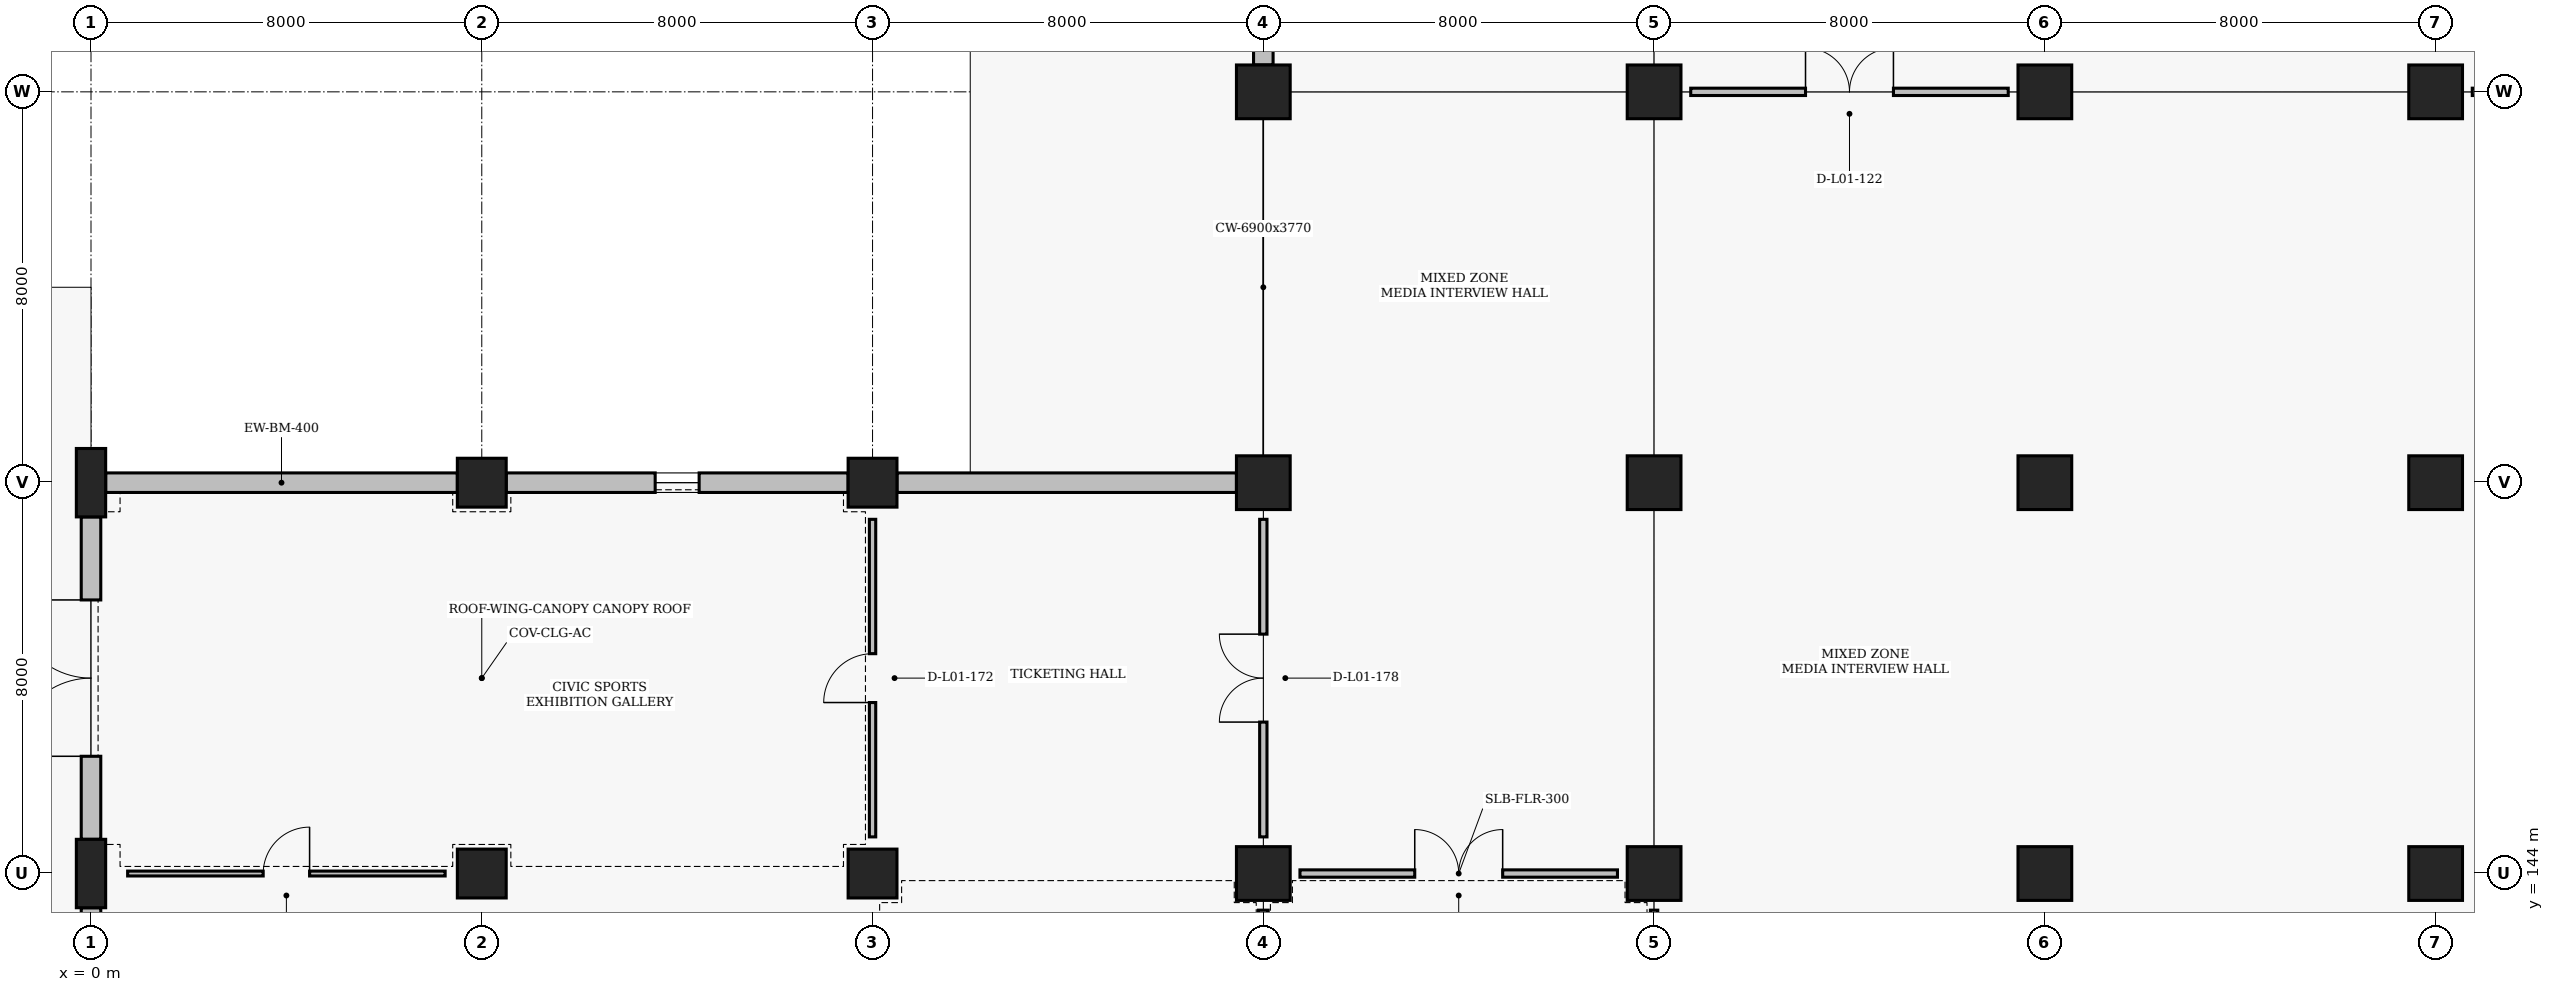
"""IFC4 building model, lengths in metres.
Left out: names, types, materials, properties, quantities, classifications, styles, units other than length and angle.
Written with IfcOpenShell. Run it as: python <this file> out.ifc"""

import sys

from ifc_helpers import new_model, si_unit, direction, frame, frame_2d, origin, origin_2d, place, context, subcontext, project, spatial, rectangle, circle, extrude, element, fill, save


model = new_model("IFC4")
c1 = context("Model", 3, precision=1e-05, world=origin(), true_north=direction((0.0, 1.0)))
c2 = subcontext(c1, "Body", "Model", "MODEL_VIEW")
j1 = project(units=[si_unit("LENGTHUNIT", "METRE"), si_unit("PLANEANGLEUNIT", "RADIAN")], contexts=[c1])
p1 = place(None, origin())
s1 = spatial("IfcSite", under=j1, at=p1, CompositionType="ELEMENT")
p2 = place(p1, origin())
s2 = spatial("IfcBuilding", under=s1, at=p2, CompositionType="ELEMENT")
p3 = place(p2, origin())
s3 = spatial("IfcBuildingStorey", under=s2, at=p3, CompositionType="ELEMENT", Elevation=0.0)
for number, where, z_axis, x_axis in (
    (1, (0.0, 144.0, 0.0), (0.0, 0.0, 1.0), (1.0, 0.0, 0.0)),
    (2, (0.0, 152.0, 0.0), (0.0, 0.0, 1.0), (1.0, 0.0, 0.0)),
):
    element("IfcColumn", number, at=place(p3, frame(where, z_axis=z_axis, x_axis=x_axis)), inside=s3, PredefinedType="PILASTER", context=c2, shape_type="SweptSolid", body=[
        extrude(rectangle(XDim=0.6, YDim=1.4, at=origin_2d()), origin(), (0.0, 0.0, 1.0), 4.8),
    ])
for number, where, z_axis, x_axis in (
    (3, (8.0, 144.0, 0.0), (0.0, 0.0, 1.0), (1.0, 0.0, 0.0)),
    (4, (8.0, 152.0, 0.0), (0.0, 0.0, 1.0), (1.0, 0.0, 0.0)),
    (5, (16.0, 144.0, 0.0), (0.0, 0.0, 1.0), (1.0, 0.0, 0.0)),
    (6, (16.0, 152.0, 0.0), (0.0, 0.0, 1.0), (1.0, 0.0, 0.0)),
):
    element("IfcColumn", number, at=place(p3, frame(where, z_axis=z_axis, x_axis=x_axis)), inside=s3, PredefinedType="COLUMN", context=c2, shape_type="SweptSolid", body=[
        extrude(circle(Radius=0.5, at=origin_2d()), origin(), (0.0, 0.0, 1.0), 4.8),
    ])
for number, where, z_axis, x_axis in (
    (7, (24.0, 144.0, 0.0), (0.0, 0.0, 1.0), (1.0, 0.0, 0.0)),
    (8, (24.0, 152.0, 0.0), (0.0, 0.0, 1.0), (1.0, 0.0, 0.0)),
    (9, (24.0, 160.0, 0.0), (0.0, 0.0, 1.0), (1.0, 0.0, 0.0)),
    (10, (32.0, 144.0, 0.0), (0.0, 0.0, 1.0), (1.0, 0.0, 0.0)),
    (11, (32.0, 152.0, 0.0), (0.0, 0.0, 1.0), (1.0, 0.0, 0.0)),
    (12, (32.0, 160.0, 0.0), (0.0, 0.0, 1.0), (1.0, 0.0, 0.0)),
    (13, (40.0, 144.0, 0.0), (0.0, 0.0, 1.0), (1.0, 0.0, 0.0)),
    (14, (40.0, 152.0, 0.0), (0.0, 0.0, 1.0), (1.0, 0.0, 0.0)),
    (15, (40.0, 160.0, 0.0), (0.0, 0.0, 1.0), (1.0, 0.0, 0.0)),
    (16, (48.0, 144.0, 0.0), (0.0, 0.0, 1.0), (1.0, 0.0, 0.0)),
    (17, (48.0, 152.0, 0.0), (0.0, 0.0, 1.0), (1.0, 0.0, 0.0)),
    (18, (48.0, 160.0, 0.0), (0.0, 0.0, 1.0), (1.0, 0.0, 0.0)),
):
    element("IfcColumn", number, at=place(p3, frame(where, z_axis=z_axis, x_axis=x_axis)), inside=s3, PredefinedType="COLUMN", context=c2, shape_type="SweptSolid", body=[
        extrude(rectangle(XDim=1.1, YDim=1.1, at=origin_2d()), origin(), (0.0, 0.0, 1.0), 4.8),
    ])
p4 = place(p3, frame((0.0, 136.7, 0.0), z_axis=(0.0, 0.0, 1.0), x_axis=(0.0, 1.0, 0.0)))
e19 = element("IfcWall", 19, at=p4, inside=s3, PredefinedType="SOLIDWALL", context=c2, shape_type="SweptSolid", body=[
    extrude(rectangle(XDim=6.6, YDim=0.4, at=frame_2d((3.3, 0.0))), origin(), (0.0, 0.0, 1.0), 3.91),
])
p5 = place(p4, frame((2.0, 0.0, 0.0)))
e20 = element("IfcOpeningElement", 20, at=p5, cuts=e19, PredefinedType="OPENING", context=c2, shape_type="SweptSolid", body=[
    extrude(rectangle(XDim=2.6, YDim=2.5, at=frame_2d((1.3, 1.25))), frame((0.0, 0.21, 0.0), z_axis=(0.0, -1.0, 0.0), x_axis=(1.0, 0.0, 0.0)), (0.0, 0.0, 1.0), 0.42),
])
p6 = place(p3, frame((0.3, 152.0, 0.0), z_axis=(0.0, 0.0, 1.0), x_axis=(1.0, 0.0, 0.0)))
e21 = element("IfcWall", 21, at=p6, inside=s3, PredefinedType="SOLIDWALL", context=c2, shape_type="SweptSolid", body=[
    extrude(rectangle(XDim=7.2, YDim=0.4, at=frame_2d((3.6, 0.0))), origin(), (0.0, 0.0, 1.0), 3.87),
])
p7 = place(p3, frame((0.0, 144.7, 0.0), z_axis=(0.0, 0.0, 1.0), x_axis=(0.0, 1.0, 0.0)))
e22 = element("IfcWall", 22, at=p7, inside=s3, PredefinedType="SOLIDWALL", context=c2, shape_type="SweptSolid", body=[
    extrude(rectangle(XDim=6.6, YDim=0.4, at=frame_2d((3.3, 0.0))), origin(), (0.0, 0.0, 1.0), 3.95),
])
p8 = place(p7, frame((1.7, 0.0, 0.0)))
e23 = element("IfcOpeningElement", 23, at=p8, cuts=e22, PredefinedType="OPENING", context=c2, shape_type="SweptSolid", body=[
    extrude(rectangle(XDim=3.2, YDim=2.7, at=frame_2d((1.6, 1.35))), frame((0.0, 0.21, 0.0), z_axis=(0.0, -1.0, 0.0), x_axis=(1.0, 0.0, 0.0)), (0.0, 0.0, 1.0), 0.42),
])
p9 = place(p3, frame((8.5, 152.0, 0.0), z_axis=(0.0, 0.0, 1.0), x_axis=(1.0, 0.0, 0.0)))
e24 = element("IfcWall", 24, at=p9, inside=s3, PredefinedType="SOLIDWALL", context=c2, shape_type="SweptSolid", body=[
    extrude(rectangle(XDim=7.0, YDim=0.4, at=frame_2d((3.5, 0.0))), origin(), (0.0, 0.0, 1.0), 3.87),
])
p10 = place(p9, frame((3.05, 0.0, 0.95)))
e25 = element("IfcOpeningElement", 25, at=p10, cuts=e24, PredefinedType="OPENING", context=c2, shape_type="SweptSolid", body=[
    extrude(rectangle(XDim=0.9, YDim=1.5, at=frame_2d((0.45, 0.75))), frame((0.0, 0.21, 0.0), z_axis=(0.0, -1.0, 0.0), x_axis=(1.0, 0.0, 0.0)), (0.0, 0.0, 1.0), 0.42),
])
p11 = place(p3, frame((16.5, 152.0, 0.0), z_axis=(0.0, 0.0, 1.0), x_axis=(1.0, 0.0, 0.0)))
e26 = element("IfcWall", 26, at=p11, inside=s3, PredefinedType="SOLIDWALL", context=c2, shape_type="SweptSolid", body=[
    extrude(rectangle(XDim=6.95, YDim=0.4, at=frame_2d((3.475, 0.0))), origin(), (0.0, 0.0, 1.0), 3.77),
])
p12 = place(p3, frame((24.0, 160.55, 0.0), z_axis=(0.0, 0.0, 1.0), x_axis=(0.0, 1.0, 0.0)))
e27 = element("IfcWall", 27, at=p12, inside=s3, PredefinedType="SOLIDWALL", context=c2, shape_type="SweptSolid", body=[
    extrude(rectangle(XDim=6.9, YDim=0.4, at=frame_2d((3.45, 0.0))), origin(), (0.0, 0.0, 1.0), 3.87),
])
p13 = place(p3, frame((24.0, 136.75, 0.0), z_axis=(0.0, 0.0, 1.0), x_axis=(0.0, 1.0, 0.0)))
e28 = element("IfcWall", 28, at=p13, inside=s3, PredefinedType="PARTITIONING", context=c2, shape_type="SweptSolid", body=[
    extrude(rectangle(XDim=6.5, YDim=0.2, at=frame_2d((3.25, 0.0))), origin(), (0.0, 0.0, 1.0), 3.77),
])
p14 = place(p3, frame((24.75, 144.0, 0.0), z_axis=(0.0, 0.0, 1.0), x_axis=(1.0, 0.0, 0.0)))
e29 = element("IfcWall", 29, at=p14, inside=s3, PredefinedType="PARTITIONING", context=c2, shape_type="SweptSolid", body=[
    extrude(rectangle(XDim=6.5, YDim=0.15, at=frame_2d((3.25, 0.0))), origin(), (0.0, 0.0, 1.0), 3.87),
])
p15 = place(p14, frame((2.35, 0.0, 0.0)))
e30 = element("IfcOpeningElement", 30, at=p15, cuts=e29, PredefinedType="OPENING", context=c2, shape_type="SweptSolid", body=[
    extrude(rectangle(XDim=1.8, YDim=2.3, at=frame_2d((0.9, 1.15))), frame((0.0, 0.085, 0.0), z_axis=(0.0, -1.0, 0.0), x_axis=(1.0, 0.0, 0.0)), (0.0, 0.0, 1.0), 0.17),
])
p16 = place(p3, frame((32.0, 136.75, 0.0), z_axis=(0.0, 0.0, 1.0), x_axis=(0.0, 1.0, 0.0)))
e31 = element("IfcWall", 31, at=p16, inside=s3, PredefinedType="PARTITIONING", context=c2, shape_type="SweptSolid", body=[
    extrude(rectangle(XDim=6.5, YDim=0.15, at=frame_2d((3.25, 0.0))), origin(), (0.0, 0.0, 1.0), 3.77),
])
p17 = place(p16, frame((2.35, 0.0, 0.0)))
e32 = element("IfcOpeningElement", 32, at=p17, cuts=e31, PredefinedType="OPENING", context=c2, shape_type="SweptSolid", body=[
    extrude(rectangle(XDim=1.8, YDim=2.3, at=frame_2d((0.9, 1.15))), frame((0.0, 0.085, 0.0), z_axis=(0.0, -1.0, 0.0), x_axis=(1.0, 0.0, 0.0)), (0.0, 0.0, 1.0), 0.17),
])
p18 = place(p3, frame((32.75, 160.0, 0.0), z_axis=(0.0, 0.0, 1.0), x_axis=(1.0, 0.0, 0.0)))
e33 = element("IfcWall", 33, at=p18, inside=s3, PredefinedType="PARTITIONING", context=c2, shape_type="SweptSolid", body=[
    extrude(rectangle(XDim=6.5, YDim=0.15, at=frame_2d((3.25, 0.0))), origin(), (0.0, 0.0, 1.0), 3.87),
])
p19 = place(p18, frame((2.35, 0.0, 0.0)))
e34 = element("IfcOpeningElement", 34, at=p19, cuts=e33, PredefinedType="OPENING", context=c2, shape_type="SweptSolid", body=[
    extrude(rectangle(XDim=1.8, YDim=2.3, at=frame_2d((0.9, 1.15))), frame((0.0, 0.085, 0.0), z_axis=(0.0, -1.0, 0.0), x_axis=(1.0, 0.0, 0.0)), (0.0, 0.0, 1.0), 0.17),
])
p20 = place(p3, frame((48.75, 160.0, 0.0), z_axis=(0.0, 0.0, 1.0), x_axis=(1.0, 0.0, 0.0)))
e35 = element("IfcWall", 35, at=p20, inside=s3, PredefinedType="PARTITIONING", context=c2, shape_type="SweptSolid", body=[
    extrude(rectangle(XDim=6.5, YDim=0.15, at=frame_2d((3.25, 0.0))), origin(), (0.0, 0.0, 1.0), 3.87),
])
p21 = place(p20, frame((2.35, 0.0, 0.0)))
e36 = element("IfcOpeningElement", 36, at=p21, cuts=e35, PredefinedType="OPENING", context=c2, shape_type="SweptSolid", body=[
    extrude(rectangle(XDim=1.8, YDim=2.3, at=frame_2d((0.9, 1.15))), frame((0.0, 0.085, 0.0), z_axis=(0.0, -1.0, 0.0), x_axis=(1.0, 0.0, 0.0)), (0.0, 0.0, 1.0), 0.17),
])
p22 = place(p3, frame((0.75, 144.0, 0.0), z_axis=(0.0, 0.0, 1.0), x_axis=(1.0, 0.0, 0.0)))
e37 = element("IfcWall", 37, at=p22, inside=s3, PredefinedType="PARTITIONING", context=c2, shape_type="SweptSolid", body=[
    extrude(rectangle(XDim=6.5, YDim=0.1, at=frame_2d((3.25, 0.0))), origin(), (0.0, 0.0, 1.0), 3.91),
])
p23 = place(p22, frame((2.775, 0.0, 0.0)))
e38 = element("IfcOpeningElement", 38, at=p23, cuts=e37, PredefinedType="OPENING", context=c2, shape_type="SweptSolid", body=[
    extrude(rectangle(XDim=0.95, YDim=2.1, at=frame_2d((0.475, 1.05))), frame((0.0, 0.06, 0.0), z_axis=(0.0, -1.0, 0.0), x_axis=(1.0, 0.0, 0.0)), (0.0, 0.0, 1.0), 0.12),
])
p24 = place(p3, frame((16.0, 144.75, 0.0), z_axis=(0.0, 0.0, 1.0), x_axis=(0.0, 1.0, 0.0)))
e39 = element("IfcWall", 39, at=p24, inside=s3, PredefinedType="PARTITIONING", context=c2, shape_type="SweptSolid", body=[
    extrude(rectangle(XDim=6.5, YDim=0.13, at=frame_2d((3.25, 0.0))), origin(), (0.0, 0.0, 1.0), 3.87),
])
p25 = place(p24, frame((2.75, 0.0, 0.0)))
e40 = element("IfcOpeningElement", 40, at=p25, cuts=e39, PredefinedType="OPENING", context=c2, shape_type="SweptSolid", body=[
    extrude(rectangle(XDim=1.0, YDim=2.1, at=frame_2d((0.5, 1.05))), frame((0.0, 0.075, 0.0), z_axis=(0.0, -1.0, 0.0), x_axis=(1.0, 0.0, 0.0)), (0.0, 0.0, 1.0), 0.15),
])
p26 = place(p3, frame((24.0, 144.75, 0.0), z_axis=(0.0, 0.0, 1.0), x_axis=(0.0, 1.0, 0.0)))
e41 = element("IfcWall", 41, at=p26, inside=s3, PredefinedType="PARTITIONING", context=c2, shape_type="SweptSolid", body=[
    extrude(rectangle(XDim=6.5, YDim=0.15, at=frame_2d((3.25, 0.0))), origin(), (0.0, 0.0, 1.0), 3.77),
])
p27 = place(p26, frame((2.35, 0.0, 0.0)))
e42 = element("IfcOpeningElement", 42, at=p27, cuts=e41, PredefinedType="OPENING", context=c2, shape_type="SweptSolid", body=[
    extrude(rectangle(XDim=1.8, YDim=2.3, at=frame_2d((0.9, 1.15))), frame((0.0, 0.085, 0.0), z_axis=(0.0, -1.0, 0.0), x_axis=(1.0, 0.0, 0.0)), (0.0, 0.0, 1.0), 0.17),
])
p28 = place(p8, origin())
e43 = element("IfcDoor", 43, at=p28, inside=s3, OperationType="DOUBLE_SWING_LEFT", PredefinedType="DOOR", context=c2, shape_type="SweptSolid", body=[
    extrude(rectangle(XDim=3.2, YDim=2.7, at=frame_2d((1.6, 1.35))), frame((0.0, 0.025, 0.0), z_axis=(0.0, -1.0, 0.0), x_axis=(1.0, 0.0, 0.0)), (0.0, 0.0, 1.0), 0.05),
])
fill(e23, e43)
p29 = place(p10, origin())
e44 = element("IfcWindow", 44, at=p29, inside=s3, PartitioningType="SINGLE_PANEL", PredefinedType="WINDOW", context=c2, shape_type="SweptSolid", body=[
    extrude(rectangle(XDim=0.9, YDim=1.5, at=frame_2d((0.45, 0.75))), frame((0.0, 0.03, 0.0), z_axis=(0.0, -1.0, 0.0), x_axis=(1.0, 0.0, 0.0)), (0.0, 0.0, 1.0), 0.06),
])
fill(e25, e44)
p30 = place(p15, origin())
e45 = element("IfcDoor", 45, at=p30, inside=s3, OperationType="DOUBLE_SWING_LEFT", PredefinedType="DOOR", context=c2, shape_type="SweptSolid", body=[
    extrude(rectangle(XDim=1.8, YDim=2.3, at=frame_2d((0.9, 1.15))), frame((0.0, 0.025, 0.0), z_axis=(0.0, -1.0, 0.0), x_axis=(1.0, 0.0, 0.0)), (0.0, 0.0, 1.0), 0.05),
])
fill(e30, e45)
p31 = place(p19, origin())
e46 = element("IfcDoor", 46, at=p31, inside=s3, OperationType="DOUBLE_SWING_LEFT", PredefinedType="DOOR", context=c2, shape_type="SweptSolid", body=[
    extrude(rectangle(XDim=1.8, YDim=2.3, at=frame_2d((0.9, 1.15))), frame((0.0, 0.025, 0.0), z_axis=(0.0, -1.0, 0.0), x_axis=(1.0, 0.0, 0.0)), (0.0, 0.0, 1.0), 0.05),
])
fill(e34, e46)
p32 = place(p23, origin())
e47 = element("IfcDoor", 47, at=p32, inside=s3, OperationType="SINGLE_SWING_RIGHT", PredefinedType="DOOR", context=c2, shape_type="SweptSolid", body=[
    extrude(rectangle(XDim=0.95, YDim=2.1, at=frame_2d((0.475, 1.05))), frame((0.0, 0.025, 0.0), z_axis=(0.0, -1.0, 0.0), x_axis=(1.0, 0.0, 0.0)), (0.0, 0.0, 1.0), 0.05),
])
fill(e38, e47)
p33 = place(p25, origin())
e48 = element("IfcDoor", 48, at=p33, inside=s3, OperationType="SINGLE_SWING_LEFT", PredefinedType="DOOR", context=c2, shape_type="SweptSolid", body=[
    extrude(rectangle(XDim=1.0, YDim=2.1, at=frame_2d((0.5, 1.05))), frame((0.0, 0.025, 0.0), z_axis=(0.0, -1.0, 0.0), x_axis=(1.0, 0.0, 0.0)), (0.0, 0.0, 1.0), 0.05),
])
fill(e40, e48)
p34 = place(p27, origin())
e49 = element("IfcDoor", 49, at=p34, inside=s3, OperationType="DOUBLE_SWING_LEFT", PredefinedType="DOOR", context=c2, shape_type="SweptSolid", body=[
    extrude(rectangle(XDim=1.8, YDim=2.3, at=frame_2d((0.9, 1.15))), frame((0.0, 0.025, 0.0), z_axis=(0.0, -1.0, 0.0), x_axis=(1.0, 0.0, 0.0)), (0.0, 0.0, 1.0), 0.05),
])
fill(e42, e49)
save(model, sys.argv[1])
